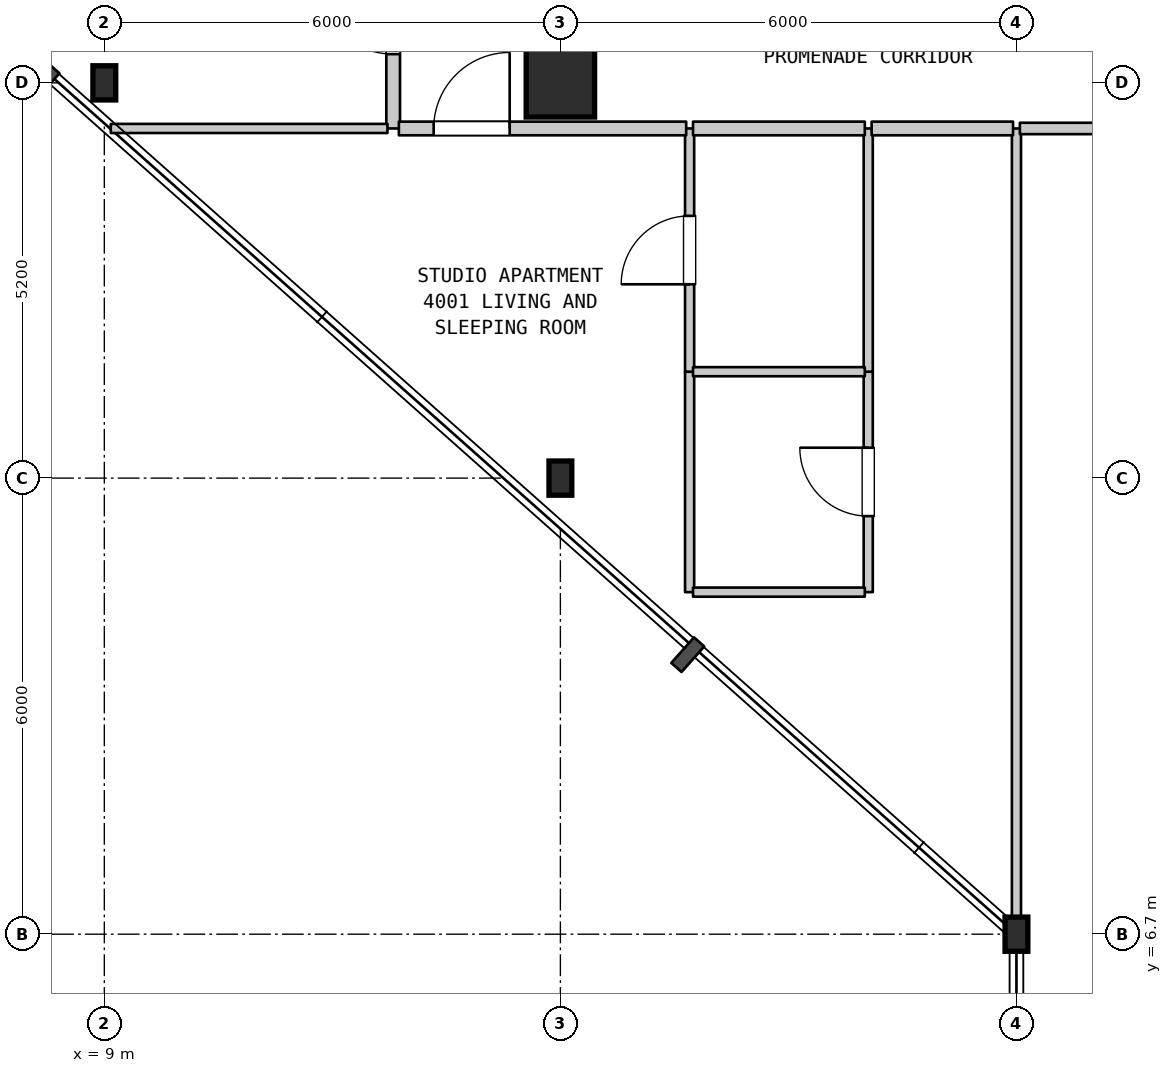
"""IFC4 building model, lengths in metres.
Left out: names, types, materials, properties, quantities, classifications, styles, units other than length and angle.
Written with IfcOpenShell. Run it as: python <this file> out.ifc"""

import sys

from ifc_helpers import new_model, si_unit, direction, frame, frame_2d, origin, origin_2d, place, context, subcontext, project, spatial, rectangle, i_section, extrude, element, fill, save


model = new_model("IFC4")
c1 = context("Model", 3, precision=1e-05, world=origin(), true_north=direction((0.0, 1.0)))
c2 = subcontext(c1, "Body", "Model", "MODEL_VIEW")
j1 = project(units=[si_unit("LENGTHUNIT", "METRE"), si_unit("PLANEANGLEUNIT", "RADIAN")], contexts=[c1])
p1 = place(None, origin())
s1 = spatial("IfcSite", under=j1, at=p1, CompositionType="ELEMENT")
p2 = place(p1, origin())
s2 = spatial("IfcBuilding", under=s1, at=p2, CompositionType="ELEMENT")
p3 = place(p2, frame((0.0, 0.0, 164.6)))
s3 = spatial("IfcBuildingStorey", under=s2, at=p3, CompositionType="ELEMENT", Elevation=164.6)
for number, where, z_axis, x_axis in (
    (1, (9.0, 17.9, 0.0), (0.0, 0.0, 1.0), (1.0, 0.0, 0.0)),
    (2, (15.0, 12.7, 0.0), (0.0, 0.0, 1.0), (1.0, 0.0, 0.0)),
):
    element("IfcColumn", number, at=place(p3, frame(where, z_axis=z_axis, x_axis=x_axis)), inside=s3, PredefinedType="COLUMN", context=c2, shape_type="SweptSolid", body=[
        extrude(i_section(OverallWidth=0.3, OverallDepth=0.45, WebThickness=0.014, FlangeThickness=0.026, FilletRadius=0.027, at=origin_2d()), origin(), (0.0, 0.0, 1.0), 4.5),
    ])
p4 = place(p3, frame((15.0, 17.9, 0.0), z_axis=(0.0, 0.0, 1.0), x_axis=(1.0, 0.0, 0.0)))
e3 = element("IfcColumn", 3, at=p4, inside=s3, PredefinedType="COLUMN", context=c2, shape_type="SweptSolid", body=[
    extrude(rectangle(XDim=0.9, YDim=0.9, at=origin_2d()), origin(), (0.0, 0.0, 1.0), 4.5),
])
p5 = place(p3, frame((21.0, 6.7, 0.0), z_axis=(0.0, 0.0, 1.0), x_axis=(1.0, 0.0, 0.0)))
e4 = element("IfcColumn", 4, at=p5, inside=s3, PredefinedType="COLUMN", context=c2, shape_type="SweptSolid", body=[
    extrude(i_section(OverallWidth=0.3, OverallDepth=0.45, WebThickness=0.014, FlangeThickness=0.026, FilletRadius=0.027, at=origin_2d()), origin(), (0.0, 0.0, 1.0), 4.5),
])
p6 = place(p3, frame((12.8, 17.3, 0.0), z_axis=(0.0, 0.0, 1.0), x_axis=(0.0, 1.0, 0.0)))
e5 = element("IfcWall", 5, at=p6, inside=s3, PredefinedType="STANDARD", context=c2, shape_type="SweptSolid", body=[
    extrude(rectangle(XDim=3.1, YDim=0.18, at=frame_2d((1.55, 0.0))), origin(), (0.0, 0.0, 1.0), 4.19),
])
p7 = place(p6, frame((0.978, 0.0, 0.0)))
e6 = element("IfcOpeningElement", 6, at=p7, cuts=e5, PredefinedType="OPENING", context=c2, shape_type="SweptSolid", body=[
    extrude(rectangle(XDim=1.0, YDim=2.15, at=frame_2d((0.5, 1.075))), frame((0.0, 0.1, 0.0), z_axis=(0.0, -1.0, 0.0), x_axis=(1.0, 0.0, 0.0)), (0.0, 0.0, 1.0), 0.2),
])
p8 = place(p3, frame((16.7, 11.2, 0.0), z_axis=(0.0, 0.0, 1.0), x_axis=(0.0, 1.0, 0.0)))
e7 = element("IfcWall", 7, at=p8, inside=s3, PredefinedType="PARTITIONING", context=c2, shape_type="SweptSolid", body=[
    extrude(rectangle(XDim=2.9, YDim=0.12, at=frame_2d((1.45, 0.0))), origin(), (0.0, 0.0, 1.0), 4.19),
])
p9 = place(p3, frame((16.7, 14.1, 0.0), z_axis=(0.0, 0.0, 1.0), x_axis=(0.0, 1.0, 0.0)))
e8 = element("IfcWall", 8, at=p9, inside=s3, PredefinedType="PARTITIONING", context=c2, shape_type="SweptSolid", body=[
    extrude(rectangle(XDim=3.2, YDim=0.12, at=frame_2d((1.6, 0.0))), origin(), (0.0, 0.0, 1.0), 4.19),
])
p10 = place(p9, frame((1.15, 0.0, 0.0)))
e9 = element("IfcOpeningElement", 9, at=p10, cuts=e8, PredefinedType="OPENING", context=c2, shape_type="SweptSolid", body=[
    extrude(rectangle(XDim=0.9, YDim=2.15, at=frame_2d((0.45, 1.075))), frame((0.0, 0.07, 0.0), z_axis=(0.0, -1.0, 0.0), x_axis=(1.0, 0.0, 0.0)), (0.0, 0.0, 1.0), 0.14),
])
p11 = place(p3, frame((19.05, 11.2, 0.0), z_axis=(0.0, 0.0, 1.0), x_axis=(0.0, 1.0, 0.0)))
e10 = element("IfcWall", 10, at=p11, inside=s3, PredefinedType="PARTITIONING", context=c2, shape_type="SweptSolid", body=[
    extrude(rectangle(XDim=2.9, YDim=0.12, at=frame_2d((1.45, 0.0))), origin(), (0.0, 0.0, 1.0), 4.19),
])
p12 = place(p11, frame((1.0, 0.0, 0.0)))
e11 = element("IfcOpeningElement", 11, at=p12, cuts=e10, PredefinedType="OPENING", context=c2, shape_type="SweptSolid", body=[
    extrude(rectangle(XDim=0.9, YDim=2.1, at=frame_2d((0.45, 1.05))), frame((0.0, 0.07, 0.0), z_axis=(0.0, -1.0, 0.0), x_axis=(1.0, 0.0, 0.0)), (0.0, 0.0, 1.0), 0.14),
])
p13 = place(p3, frame((19.05, 14.1, 0.0), z_axis=(0.0, 0.0, 1.0), x_axis=(0.0, 1.0, 0.0)))
e12 = element("IfcWall", 12, at=p13, inside=s3, PredefinedType="PARTITIONING", context=c2, shape_type="SweptSolid", body=[
    extrude(rectangle(XDim=3.2, YDim=0.12, at=frame_2d((1.6, 0.0))), origin(), (0.0, 0.0, 1.0), 4.19),
])
p14 = place(p3, frame((21.0, 6.71, 0.0), z_axis=(0.0, 0.0, 1.0), x_axis=(0.0, 1.0, 0.0)))
e13 = element("IfcWall", 13, at=p14, inside=s3, PredefinedType="PARTITIONING", context=c2, shape_type="SweptSolid", body=[
    extrude(rectangle(XDim=10.59, YDim=0.12, at=frame_2d((5.295, 0.0))), origin(), (0.0, 0.0, 1.0), 4.19),
])
for number, where, z_axis, x_axis in (
    (14, (16.745, 11.2, 0.0), (0.0, 0.0, 1.0), (1.0, 0.0, 0.0)),
    (15, (16.745, 14.1, 0.0), (0.0, 0.0, 1.0), (1.0, 0.0, 0.0)),
):
    element("IfcWall", number, at=place(p3, frame(where, z_axis=z_axis, x_axis=x_axis)), inside=s3, PredefinedType="PARTITIONING", context=c2, shape_type="SweptSolid", body=[
        extrude(rectangle(XDim=2.26, YDim=0.12, at=frame_2d((1.13, 0.0))), origin(), (0.0, 0.0, 1.0), 4.19),
    ])
p15 = place(p3, frame((9.085, 17.3, 0.0), z_axis=(0.0, 0.0, 1.0), x_axis=(1.0, 0.0, 0.0)))
e16 = element("IfcWall", 16, at=p15, inside=s3, PredefinedType="PARTITIONING", context=c2, shape_type="SweptSolid", body=[
    extrude(rectangle(XDim=3.64, YDim=0.12, at=frame_2d((1.82, 0.0))), origin(), (0.0, 0.0, 1.0), 4.19),
])
p16 = place(p3, frame((12.875, 17.3, 0.0), z_axis=(0.0, 0.0, 1.0), x_axis=(1.0, 0.0, 0.0)))
e17 = element("IfcWall", 17, at=p16, inside=s3, PredefinedType="STANDARD", context=c2, shape_type="SweptSolid", body=[
    extrude(rectangle(XDim=3.78, YDim=0.18, at=frame_2d((1.89, 0.0))), origin(), (0.0, 0.0, 1.0), 4.19),
])
p17 = place(p16, frame((0.458, 0.0, 0.0)))
e18 = element("IfcOpeningElement", 18, at=p17, cuts=e17, PredefinedType="OPENING", context=c2, shape_type="SweptSolid", body=[
    extrude(rectangle(XDim=1.0, YDim=2.15, at=frame_2d((0.5, 1.075))), frame((0.0, 0.1, 0.0), z_axis=(0.0, -1.0, 0.0), x_axis=(1.0, 0.0, 0.0)), (0.0, 0.0, 1.0), 0.2),
])
p18 = place(p3, frame((16.745, 17.3, 0.0), z_axis=(0.0, 0.0, 1.0), x_axis=(1.0, 0.0, 0.0)))
e19 = element("IfcWall", 19, at=p18, inside=s3, PredefinedType="STANDARD", context=c2, shape_type="SweptSolid", body=[
    extrude(rectangle(XDim=2.26, YDim=0.18, at=frame_2d((1.13, 0.0))), origin(), (0.0, 0.0, 1.0), 4.19),
])
p19 = place(p3, frame((19.095, 17.3, 0.0), z_axis=(0.0, 0.0, 1.0), x_axis=(1.0, 0.0, 0.0)))
e20 = element("IfcWall", 20, at=p19, inside=s3, PredefinedType="STANDARD", context=c2, shape_type="SweptSolid", body=[
    extrude(rectangle(XDim=1.86, YDim=0.18, at=frame_2d((0.93, 0.0))), origin(), (0.0, 0.0, 1.0), 4.19),
])
p20 = place(p3, frame((21.045, 17.3, 0.0), z_axis=(0.0, 0.0, 1.0), x_axis=(1.0, 0.0, 0.0)))
e21 = element("IfcWall", 21, at=p20, inside=s3, PredefinedType="STANDARD", context=c2, shape_type="SweptSolid", body=[
    extrude(rectangle(XDim=7.41, YDim=0.15, at=frame_2d((3.705, 0.0))), origin(), (0.0, 0.0, 1.0), 4.19),
])
p21 = place(p20, frame((3.135, 0.0, 0.0)))
e22 = element("IfcOpeningElement", 22, at=p21, cuts=e21, PredefinedType="OPENING", context=c2, shape_type="SweptSolid", body=[
    extrude(rectangle(XDim=1.0, YDim=2.15, at=frame_2d((0.5, 1.075))), frame((0.0, 0.085, 0.0), z_axis=(0.0, -1.0, 0.0), x_axis=(1.0, 0.0, 0.0)), (0.0, 0.0, 1.0), 0.17),
])
p22 = place(p7, origin())
e23 = element("IfcDoor", 23, at=p22, inside=s3, OperationType="SINGLE_SWING_RIGHT", PredefinedType="DOOR", context=c2, shape_type="SweptSolid", body=[
    extrude(rectangle(XDim=1.0, YDim=2.15, at=frame_2d((0.5, 1.075))), frame((0.0, 0.025, 0.0), z_axis=(0.0, -1.0, 0.0), x_axis=(1.0, 0.0, 0.0)), (0.0, 0.0, 1.0), 0.05),
])
fill(e6, e23)
p23 = place(p10, origin())
e24 = element("IfcDoor", 24, at=p23, inside=s3, OperationType="SINGLE_SWING_LEFT", PredefinedType="DOOR", context=c2, shape_type="SweptSolid", body=[
    extrude(rectangle(XDim=0.9, YDim=2.15, at=frame_2d((0.45, 1.075))), frame((0.0, 0.025, 0.0), z_axis=(0.0, -1.0, 0.0), x_axis=(1.0, 0.0, 0.0)), (0.0, 0.0, 1.0), 0.05),
])
fill(e9, e24)
p24 = place(p12, origin())
e25 = element("IfcDoor", 25, at=p24, inside=s3, OperationType="SINGLE_SWING_RIGHT", PredefinedType="DOOR", context=c2, shape_type="SweptSolid", body=[
    extrude(rectangle(XDim=0.9, YDim=2.1, at=frame_2d((0.45, 1.05))), frame((0.0, 0.025, 0.0), z_axis=(0.0, -1.0, 0.0), x_axis=(1.0, 0.0, 0.0)), (0.0, 0.0, 1.0), 0.05),
])
fill(e11, e25)
p25 = place(p17, origin())
e26 = element("IfcDoor", 26, at=p25, inside=s3, OperationType="SINGLE_SWING_RIGHT", PredefinedType="DOOR", context=c2, shape_type="SweptSolid", body=[
    extrude(rectangle(XDim=1.0, YDim=2.15, at=frame_2d((0.5, 1.075))), frame((0.0, 0.025, 0.0), z_axis=(0.0, -1.0, 0.0), x_axis=(1.0, 0.0, 0.0)), (0.0, 0.0, 1.0), 0.05),
])
fill(e18, e26)
save(model, sys.argv[1])
